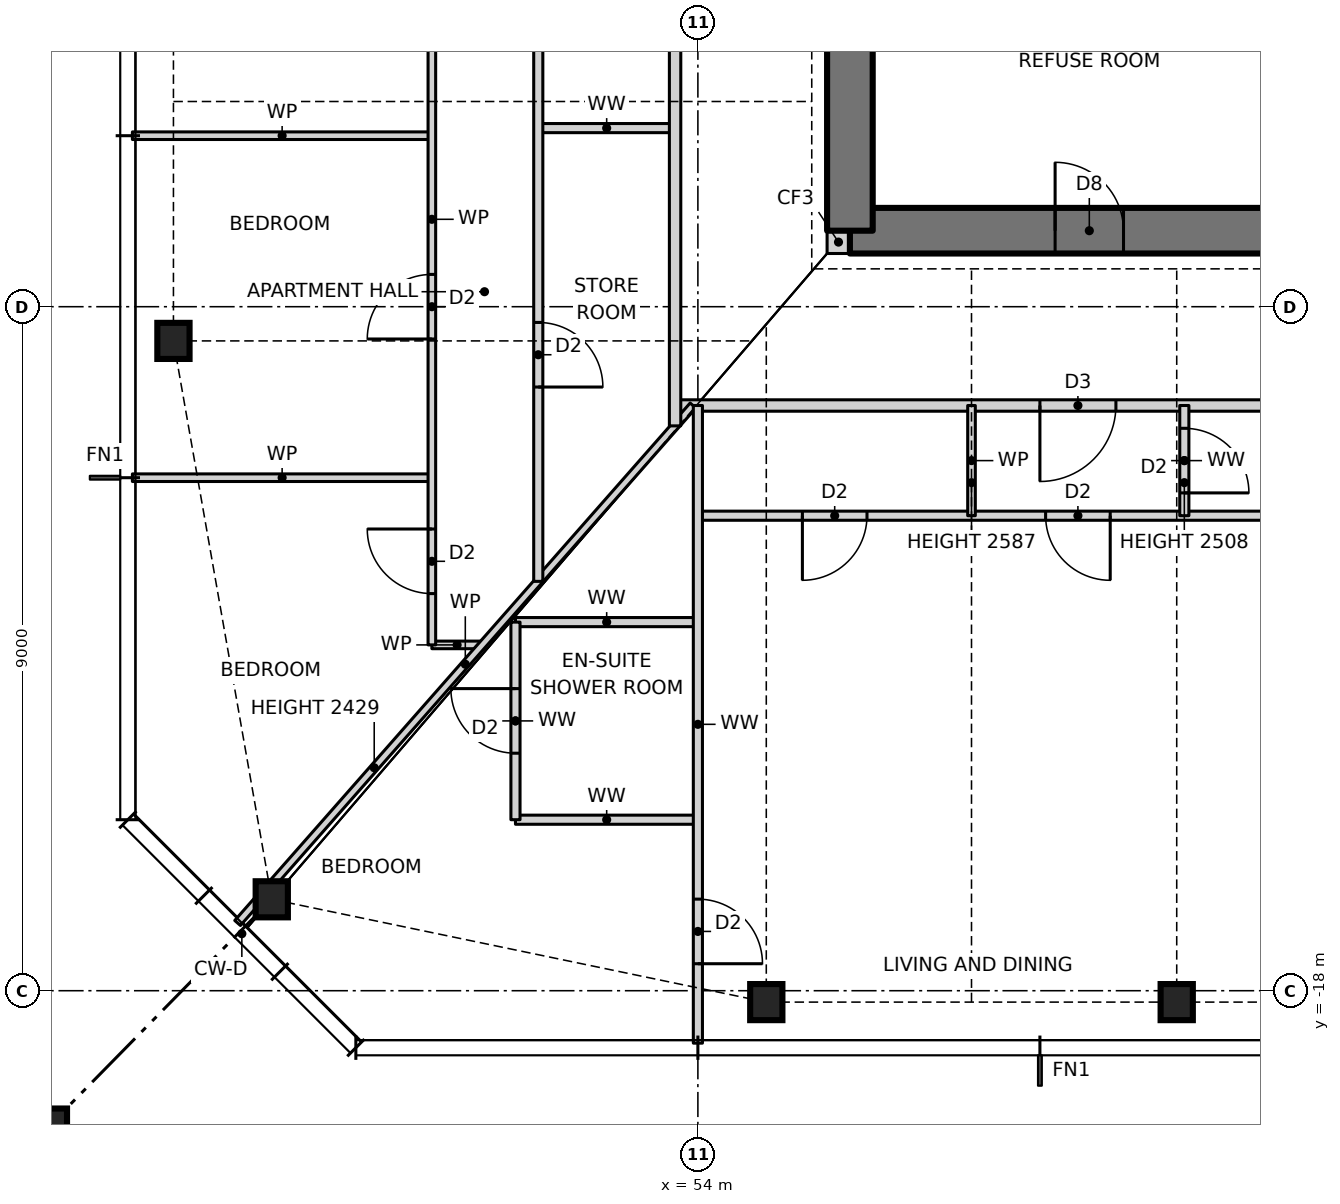
"""IFC4 building model, lengths in metres.
Left out: names, types, materials, properties, quantities, classifications, styles, units other than length and angle.
Written with IfcOpenShell. Run it as: python <this file> out.ifc"""

import sys

from ifc_helpers import new_model, si_unit, direction, frame, frame_2d, origin, origin_2d, place, context, subcontext, project, spatial, rectangle, hollow_rectangle, i_section, extrude, element, fill, save


model = new_model("IFC4")
c1 = context("Model", 3, precision=1e-05, world=origin(), true_north=direction((0.0, 1.0)))
c2 = subcontext(c1, "Body", "Model", "MODEL_VIEW")
j1 = project(units=[si_unit("LENGTHUNIT", "METRE"), si_unit("PLANEANGLEUNIT", "RADIAN")], contexts=[c1])
p1 = place(None, origin())
s1 = spatial("IfcSite", under=j1, at=p1, CompositionType="ELEMENT")
p2 = place(p1, origin())
s2 = spatial("IfcBuilding", under=s1, at=p2, CompositionType="ELEMENT")
p3 = place(p2, frame((0.0, 0.0, 25.5)))
s3 = spatial("IfcBuildingStorey", under=s2, at=p3, CompositionType="ELEMENT", Elevation=25.5)
for number, where, z_axis, x_axis in (
    (1, (48.394, -16.797, 0.0), (0.0, 0.0, 1.0), (1.0, 0.0, 0.0)),
    (2, (54.9, -18.15, 0.0), (0.0, 0.0, 1.0), (1.0, 0.0, 0.0)),
    (3, (60.3, -18.15, 0.0), (0.0, 0.0, 1.0), (1.0, 0.0, 0.0)),
    (4, (47.1, -9.45, 0.0), (0.0, 0.0, 1.0), (1.0, 0.0, 0.0)),
):
    element("IfcColumn", number, at=place(p3, frame(where, z_axis=z_axis, x_axis=x_axis)), inside=s3, PredefinedType="COLUMN", context=c2, shape_type="SweptSolid", body=[
        extrude(i_section(OverallWidth=0.424, OverallDepth=0.475, WebThickness=0.048, FlangeThickness=0.077, at=origin_2d()), origin(), (0.0, 0.0, 1.0), 3.5),
    ])
p4 = place(p3, frame((45.1, -20.15, 0.0), z_axis=(0.0, 0.0, 1.0), x_axis=(1.0, 0.0, 0.0)))
e5 = element("IfcColumn", 5, at=p4, inside=s3, PredefinedType="COLUMN", context=c2, shape_type="SweptSolid", body=[
    extrude(hollow_rectangle(XDim=1.2, YDim=1.2, WallThickness=0.07, at=origin_2d()), origin(), (0.0, 0.0, 1.0), 3.5),
])
p5 = place(p3, frame((55.7, -8.15, 0.0), z_axis=(0.0, 0.0, 1.0), x_axis=(1.0, 0.0, 0.0)))
e6 = element("IfcWall", 6, at=p5, inside=s3, PredefinedType="SOLIDWALL", context=c2, shape_type="SweptSolid", body=[
    extrude(rectangle(XDim=0.3, YDim=0.3, at=frame_2d((0.15, 0.0))), origin(), (0.0, 0.0, 1.0), 3.5),
])
p6 = place(p3, frame((56.0, -8.0, 0.0), z_axis=(0.0, 0.0, 1.0), x_axis=(1.0, 0.0, 0.0)))
e7 = element("IfcWall", 7, at=p6, inside=s3, PredefinedType="SHEAR", context=c2, shape_type="SweptSolid", body=[
    extrude(rectangle(XDim=14.0, YDim=0.6, at=frame_2d((7.0, 0.0))), origin(), (0.0, 0.0, 1.0), 3.5),
])
p7 = place(p6, frame((2.7, 0.0, 0.0)))
e8 = element("IfcOpeningElement", 8, at=p7, cuts=e7, PredefinedType="OPENING", context=c2, shape_type="SweptSolid", body=[
    extrude(rectangle(XDim=0.9, YDim=2.1, at=frame_2d((0.45, 1.05))), frame((0.0, 0.31, 0.0), z_axis=(0.0, -1.0, 0.0), x_axis=(1.0, 0.0, 0.0)), (0.0, 0.0, 1.0), 0.62),
])
p8 = place(p6, frame((7.7, 0.0, 0.0)))
e9 = element("IfcOpeningElement", 9, at=p8, cuts=e7, PredefinedType="OPENING", context=c2, shape_type="SweptSolid", body=[
    extrude(rectangle(XDim=0.9, YDim=2.1, at=frame_2d((0.45, 1.05))), frame((0.0, 0.31, 0.0), z_axis=(0.0, -1.0, 0.0), x_axis=(1.0, 0.0, 0.0)), (0.0, 0.0, 1.0), 0.62),
])
p9 = place(p3, frame((56.0, 8.0, 0.0), z_axis=(0.0, 0.0, 1.0), x_axis=(0.0, -1.0, 0.0)))
e10 = element("IfcWall", 10, at=p9, inside=s3, PredefinedType="SHEAR", context=c2, shape_type="SweptSolid", body=[
    extrude(rectangle(XDim=16.0, YDim=0.6, at=frame_2d((8.0, 0.0))), origin(), (0.0, 0.0, 1.0), 3.5),
])
p10 = place(p9, frame((7.5, 0.0, 0.0)))
e11 = element("IfcOpeningElement", 11, at=p10, cuts=e10, PredefinedType="OPENING", context=c2, shape_type="SweptSolid", body=[
    extrude(rectangle(XDim=1.0, YDim=2.1, at=frame_2d((0.5, 1.05))), frame((0.0, 0.31, 0.0), z_axis=(0.0, -1.0, 0.0), x_axis=(1.0, 0.0, 0.0)), (0.0, 0.0, 1.0), 0.62),
])
p11 = place(p3, frame((51.6, -15.75, 0.0), z_axis=(0.0, 0.0, 1.0), x_axis=(1.0, 0.0, 0.0)))
e12 = element("IfcWall", 12, at=p11, inside=s3, PredefinedType="PARTITIONING", context=c2, shape_type="SweptSolid", body=[
    extrude(rectangle(XDim=2.4, YDim=0.12, at=frame_2d((1.2, 0.0))), origin(), (0.0, 0.0, 1.0), 3.27),
])
p12 = place(p3, frame((50.5, -13.45, 0.0), z_axis=(0.0, 0.0, 1.0), x_axis=(1.0, 0.0, 0.0)))
e13 = element("IfcWall", 13, at=p12, inside=s3, PredefinedType="PARTITIONING", context=c2, shape_type="SweptSolid", body=[
    extrude(rectangle(XDim=0.664, YDim=0.1, at=frame_2d((0.332, 0.0))), origin(), (0.0, 0.0, 1.0), 3.27),
])
p13 = place(p3, frame((51.6, -13.15, 0.0), z_axis=(0.0, 0.0, 1.0), x_axis=(1.0, 0.0, 0.0)))
e14 = element("IfcWall", 14, at=p13, inside=s3, PredefinedType="PARTITIONING", context=c2, shape_type="SweptSolid", body=[
    extrude(rectangle(XDim=2.4, YDim=0.12, at=frame_2d((1.2, 0.0))), origin(), (0.0, 0.0, 1.0), 3.27),
])
p14 = place(p3, frame((54.0, -11.75, 0.0), z_axis=(0.0, 0.0, 1.0), x_axis=(1.0, 0.0, 0.0)))
e15 = element("IfcWall", 15, at=p14, inside=s3, PredefinedType="PARTITIONING", context=c2, shape_type="SweptSolid", body=[
    extrude(rectangle(XDim=19.34, YDim=0.12, at=frame_2d((9.67, 0.0))), origin(), (0.0, 0.0, 1.0), 3.27),
])
p15 = place(p14, frame((1.375, 0.0, 0.0)))
e16 = element("IfcOpeningElement", 16, at=p15, cuts=e15, PredefinedType="OPENING", context=c2, shape_type="SweptSolid", body=[
    extrude(rectangle(XDim=0.85, YDim=2.1, at=frame_2d((0.425, 1.05))), frame((0.0, 0.07, 0.0), z_axis=(0.0, -1.0, 0.0), x_axis=(1.0, 0.0, 0.0)), (0.0, 0.0, 1.0), 0.14),
])
p16 = place(p14, frame((4.575, 0.0, 0.0)))
e17 = element("IfcOpeningElement", 17, at=p16, cuts=e15, PredefinedType="OPENING", context=c2, shape_type="SweptSolid", body=[
    extrude(rectangle(XDim=0.85, YDim=2.1, at=frame_2d((0.425, 1.05))), frame((0.0, 0.07, 0.0), z_axis=(0.0, -1.0, 0.0), x_axis=(1.0, 0.0, 0.0)), (0.0, 0.0, 1.0), 0.14),
])
p17 = place(p14, frame((11.325, 0.0, 0.0)))
e18 = element("IfcOpeningElement", 18, at=p17, cuts=e15, PredefinedType="OPENING", context=c2, shape_type="SweptSolid", body=[
    extrude(rectangle(XDim=0.85, YDim=2.1, at=frame_2d((0.425, 1.05))), frame((0.0, 0.07, 0.0), z_axis=(0.0, -1.0, 0.0), x_axis=(1.0, 0.0, 0.0)), (0.0, 0.0, 1.0), 0.14),
])
p18 = place(p14, frame((16.495, 0.0, 0.0)))
e19 = element("IfcOpeningElement", 19, at=p18, cuts=e15, PredefinedType="OPENING", context=c2, shape_type="SweptSolid", body=[
    extrude(rectangle(XDim=0.85, YDim=2.1, at=frame_2d((0.425, 1.05))), frame((0.0, 0.07, 0.0), z_axis=(0.0, -1.0, 0.0), x_axis=(1.0, 0.0, 0.0)), (0.0, 0.0, 1.0), 0.14),
])
p19 = place(p3, frame((46.56, -11.25, 0.0), z_axis=(0.0, 0.0, 1.0), x_axis=(1.0, 0.0, 0.0)))
e20 = element("IfcWall", 20, at=p19, inside=s3, PredefinedType="PARTITIONING", context=c2, shape_type="SweptSolid", body=[
    extrude(rectangle(XDim=3.94, YDim=0.1, at=frame_2d((1.97, 0.0))), origin(), (0.0, 0.0, 1.0), 3.27),
])
p20 = place(p3, frame((53.7, -10.3, 0.0), z_axis=(0.0, 0.0, 1.0), x_axis=(1.0, 0.0, 0.0)))
e21 = element("IfcWall", 21, at=p20, inside=s3, PredefinedType="PARTITIONING", context=c2, shape_type="SweptSolid", body=[
    extrude(rectangle(XDim=18.6, YDim=0.15, at=frame_2d((9.3, 0.0))), origin(), (0.0, 0.0, 1.0), 3.27),
])
p21 = place(p20, frame((4.8, 0.0, 0.0)))
e22 = element("IfcOpeningElement", 22, at=p21, cuts=e21, PredefinedType="OPENING", context=c2, shape_type="SweptSolid", body=[
    extrude(rectangle(XDim=1.0, YDim=2.1, at=frame_2d((0.5, 1.05))), frame((0.0, 0.085, 0.0), z_axis=(0.0, -1.0, 0.0), x_axis=(1.0, 0.0, 0.0)), (0.0, 0.0, 1.0), 0.17),
])
p22 = place(p3, frame((46.56, -6.75, 0.0), z_axis=(0.0, 0.0, 1.0), x_axis=(1.0, 0.0, 0.0)))
e23 = element("IfcWall", 23, at=p22, inside=s3, PredefinedType="PARTITIONING", context=c2, shape_type="SweptSolid", body=[
    extrude(rectangle(XDim=3.94, YDim=0.1, at=frame_2d((1.97, 0.0))), origin(), (0.0, 0.0, 1.0), 3.27),
])
p23 = place(p3, frame((51.9, -6.65, 0.0), z_axis=(0.0, 0.0, 1.0), x_axis=(1.0, 0.0, 0.0)))
e24 = element("IfcWall", 24, at=p23, inside=s3, PredefinedType="PARTITIONING", context=c2, shape_type="SweptSolid", body=[
    extrude(rectangle(XDim=1.8, YDim=0.12, at=frame_2d((0.9, 0.0))), origin(), (0.0, 0.0, 1.0), 3.27),
])
p24 = place(p3, frame((47.944, -17.109, 0.0), z_axis=(0.0, 0.0, 1.0), x_axis=(0.660638210404, 0.750704439146, 0.0)))
e25 = element("IfcWall", 25, at=p24, inside=s3, PredefinedType="PARTITIONING", context=c2, shape_type="SweptSolid", body=[
    extrude(rectangle(XDim=9.07, YDim=0.1, at=frame_2d((4.535, 0.0))), origin(), (0.0, 0.0, 1.0), 2.429),
])
p25 = place(p3, frame((60.4, -11.75, 0.0), z_axis=(0.0, 0.0, 1.0), x_axis=(0.0, 1.0, 0.0)))
e26 = element("IfcWall", 26, at=p25, inside=s3, PredefinedType="PARTITIONING", context=c2, shape_type="SweptSolid", body=[
    extrude(rectangle(XDim=1.45, YDim=0.12, at=frame_2d((0.725, 0.0))), origin(), (0.0, 0.0, 1.0), 2.508),
])
p26 = place(p25, frame((0.3, 0.0, 0.0)))
e27 = element("IfcOpeningElement", 27, at=p26, cuts=e26, PredefinedType="OPENING", context=c2, shape_type="SweptSolid", body=[
    extrude(rectangle(XDim=0.85, YDim=2.1, at=frame_2d((0.425, 1.05))), frame((0.0, 0.07, 0.0), z_axis=(0.0, -1.0, 0.0), x_axis=(1.0, 0.0, 0.0)), (0.0, 0.0, 1.0), 0.14),
])
p27 = place(p3, frame((57.6, -11.75, 0.0), z_axis=(0.0, 0.0, 1.0), x_axis=(0.0, 1.0, 0.0)))
e28 = element("IfcWall", 28, at=p27, inside=s3, PredefinedType="PARTITIONING", context=c2, shape_type="SweptSolid", body=[
    extrude(rectangle(XDim=1.45, YDim=0.1, at=frame_2d((0.725, 0.0))), origin(), (0.0, 0.0, 1.0), 2.587),
])
p28 = place(p3, frame((54.0, -18.69, 0.0), z_axis=(0.0, 0.0, 1.0), x_axis=(0.0, 1.0, 0.0)))
e29 = element("IfcWall", 29, at=p28, inside=s3, PredefinedType="PARTITIONING", context=c2, shape_type="SweptSolid", body=[
    extrude(rectangle(XDim=8.39, YDim=0.12, at=frame_2d((4.195, 0.0))), origin(), (0.0, 0.0, 1.0), 3.27),
])
p29 = place(p28, frame((1.045, 0.0, 0.0)))
e30 = element("IfcOpeningElement", 30, at=p29, cuts=e29, PredefinedType="OPENING", context=c2, shape_type="SweptSolid", body=[
    extrude(rectangle(XDim=0.85, YDim=2.1, at=frame_2d((0.425, 1.05))), frame((0.0, 0.07, 0.0), z_axis=(0.0, -1.0, 0.0), x_axis=(1.0, 0.0, 0.0)), (0.0, 0.0, 1.0), 0.14),
])
p30 = place(p3, frame((53.7, -10.568, 0.0), z_axis=(0.0, 0.0, 1.0), x_axis=(0.0, 1.0, 0.0)))
e31 = element("IfcWall", 31, at=p30, inside=s3, PredefinedType="PARTITIONING", context=c2, shape_type="SweptSolid", body=[
    extrude(rectangle(XDim=21.136, YDim=0.15, at=frame_2d((10.568, 0.0))), origin(), (0.0, 0.0, 1.0), 3.27),
])
p31 = place(p30, frame((11.818, 0.0, 0.0)))
e32 = element("IfcOpeningElement", 32, at=p31, cuts=e31, PredefinedType="OPENING", context=c2, shape_type="SweptSolid", body=[
    extrude(rectangle(XDim=1.0, YDim=2.1, at=frame_2d((0.5, 1.05))), frame((0.0, 0.085, 0.0), z_axis=(0.0, -1.0, 0.0), x_axis=(1.0, 0.0, 0.0)), (0.0, 0.0, 1.0), 0.17),
])
p32 = place(p3, frame((51.9, -12.614, 0.0), z_axis=(0.0, 0.0, 1.0), x_axis=(0.0, 1.0, 0.0)))
e33 = element("IfcWall", 33, at=p32, inside=s3, PredefinedType="PARTITIONING", context=c2, shape_type="SweptSolid", body=[
    extrude(rectangle(XDim=25.228, YDim=0.12, at=frame_2d((12.614, 0.0))), origin(), (0.0, 0.0, 1.0), 3.27),
])
p33 = place(p32, frame((17.139, 0.0, 0.0)))
e34 = element("IfcOpeningElement", 34, at=p33, cuts=e33, PredefinedType="OPENING", context=c2, shape_type="SweptSolid", body=[
    extrude(rectangle(XDim=0.85, YDim=2.1, at=frame_2d((0.425, 1.05))), frame((0.0, 0.07, 0.0), z_axis=(0.0, -1.0, 0.0), x_axis=(1.0, 0.0, 0.0)), (0.0, 0.0, 1.0), 0.14),
])
p34 = place(p32, frame((13.939, 0.0, 0.0)))
e35 = element("IfcOpeningElement", 35, at=p34, cuts=e33, PredefinedType="OPENING", context=c2, shape_type="SweptSolid", body=[
    extrude(rectangle(XDim=0.85, YDim=2.1, at=frame_2d((0.425, 1.05))), frame((0.0, 0.07, 0.0), z_axis=(0.0, -1.0, 0.0), x_axis=(1.0, 0.0, 0.0)), (0.0, 0.0, 1.0), 0.14),
])
p35 = place(p32, frame((21.871, 0.0, 0.0)))
e36 = element("IfcOpeningElement", 36, at=p35, cuts=e33, PredefinedType="OPENING", context=c2, shape_type="SweptSolid", body=[
    extrude(rectangle(XDim=0.85, YDim=2.1, at=frame_2d((0.425, 1.05))), frame((0.0, 0.07, 0.0), z_axis=(0.0, -1.0, 0.0), x_axis=(1.0, 0.0, 0.0)), (0.0, 0.0, 1.0), 0.14),
])
p36 = place(p32, frame((7.739, 0.0, 0.0)))
e37 = element("IfcOpeningElement", 37, at=p36, cuts=e33, PredefinedType="OPENING", context=c2, shape_type="SweptSolid", body=[
    extrude(rectangle(XDim=0.85, YDim=2.1, at=frame_2d((0.425, 1.05))), frame((0.0, 0.07, 0.0), z_axis=(0.0, -1.0, 0.0), x_axis=(1.0, 0.0, 0.0)), (0.0, 0.0, 1.0), 0.14),
])
p37 = place(p32, frame((2.557, 0.0, 0.0)))
e38 = element("IfcOpeningElement", 38, at=p37, cuts=e33, PredefinedType="OPENING", context=c2, shape_type="SweptSolid", body=[
    extrude(rectangle(XDim=0.85, YDim=2.1, at=frame_2d((0.425, 1.05))), frame((0.0, 0.07, 0.0), z_axis=(0.0, -1.0, 0.0), x_axis=(1.0, 0.0, 0.0)), (0.0, 0.0, 1.0), 0.14),
])
p38 = place(p3, frame((51.6, -15.75, 0.0), z_axis=(0.0, 0.0, 1.0), x_axis=(0.0, 1.0, 0.0)))
e39 = element("IfcWall", 39, at=p38, inside=s3, PredefinedType="PARTITIONING", context=c2, shape_type="SweptSolid", body=[
    extrude(rectangle(XDim=2.6, YDim=0.12, at=frame_2d((1.3, 0.0))), origin(), (0.0, 0.0, 1.0), 3.27),
])
p39 = place(p38, frame((0.875, 0.0, 0.0)))
e40 = element("IfcOpeningElement", 40, at=p39, cuts=e39, PredefinedType="OPENING", context=c2, shape_type="SweptSolid", body=[
    extrude(rectangle(XDim=0.85, YDim=2.1, at=frame_2d((0.425, 1.05))), frame((0.0, 0.07, 0.0), z_axis=(0.0, -1.0, 0.0), x_axis=(1.0, 0.0, 0.0)), (0.0, 0.0, 1.0), 0.14),
])
p40 = place(p3, frame((50.5, -13.45, 0.0), z_axis=(0.0, 0.0, 1.0), x_axis=(0.0, 1.0, 0.0)))
e41 = element("IfcWall", 41, at=p40, inside=s3, PredefinedType="PARTITIONING", context=c2, shape_type="SweptSolid", body=[
    extrude(rectangle(XDim=11.2, YDim=0.1, at=frame_2d((5.6, 0.0))), origin(), (0.0, 0.0, 1.0), 3.27),
])
p41 = place(p40, frame((8.525, 0.0, 0.0)))
e42 = element("IfcOpeningElement", 42, at=p41, cuts=e41, PredefinedType="OPENING", context=c2, shape_type="SweptSolid", body=[
    extrude(rectangle(XDim=0.85, YDim=2.1, at=frame_2d((0.425, 1.05))), frame((0.0, 0.06, 0.0), z_axis=(0.0, -1.0, 0.0), x_axis=(1.0, 0.0, 0.0)), (0.0, 0.0, 1.0), 0.12),
])
p42 = place(p40, frame((4.025, 0.0, 0.0)))
e43 = element("IfcOpeningElement", 43, at=p42, cuts=e41, PredefinedType="OPENING", context=c2, shape_type="SweptSolid", body=[
    extrude(rectangle(XDim=0.85, YDim=2.1, at=frame_2d((0.425, 1.05))), frame((0.0, 0.06, 0.0), z_axis=(0.0, -1.0, 0.0), x_axis=(1.0, 0.0, 0.0)), (0.0, 0.0, 1.0), 0.12),
])
p43 = place(p40, frame((0.675, 0.0, 0.0)))
e44 = element("IfcOpeningElement", 44, at=p43, cuts=e41, PredefinedType="OPENING", context=c2, shape_type="SweptSolid", body=[
    extrude(rectangle(XDim=0.85, YDim=2.1, at=frame_2d((0.425, 1.05))), frame((0.0, 0.06, 0.0), z_axis=(0.0, -1.0, 0.0), x_axis=(1.0, 0.0, 0.0)), (0.0, 0.0, 1.0), 0.12),
])
p44 = place(p15, frame((0.85, 0.0, 0.0), z_axis=(0.0, 0.0, 1.0), x_axis=(-1.0, 0.0, 0.0)))
e45 = element("IfcDoor", 45, at=p44, inside=s3, OperationType="SINGLE_SWING_RIGHT", PredefinedType="DOOR", context=c2, shape_type="SweptSolid", body=[
    extrude(rectangle(XDim=0.85, YDim=2.1, at=frame_2d((0.425, 1.05))), frame((0.0, 0.025, 0.0), z_axis=(0.0, -1.0, 0.0), x_axis=(1.0, 0.0, 0.0)), (0.0, 0.0, 1.0), 0.05),
])
fill(e16, e45)
p45 = place(p21, frame((1.0, 0.0, 0.0), z_axis=(0.0, 0.0, 1.0), x_axis=(-1.0, 0.0, 0.0)))
e46 = element("IfcDoor", 46, at=p45, inside=s3, OperationType="SINGLE_SWING_RIGHT", PredefinedType="DOOR", context=c2, shape_type="SweptSolid", body=[
    extrude(rectangle(XDim=1.0, YDim=2.1, at=frame_2d((0.5, 1.05))), frame((0.0, 0.025, 0.0), z_axis=(0.0, -1.0, 0.0), x_axis=(1.0, 0.0, 0.0)), (0.0, 0.0, 1.0), 0.05),
])
fill(e22, e46)
p46 = place(p16, frame((0.85, 0.0, 0.0), z_axis=(0.0, 0.0, 1.0), x_axis=(-1.0, 0.0, 0.0)))
e47 = element("IfcDoor", 47, at=p46, inside=s3, OperationType="SINGLE_SWING_LEFT", PredefinedType="DOOR", context=c2, shape_type="SweptSolid", body=[
    extrude(rectangle(XDim=0.85, YDim=2.1, at=frame_2d((0.425, 1.05))), frame((0.0, 0.025, 0.0), z_axis=(0.0, -1.0, 0.0), x_axis=(1.0, 0.0, 0.0)), (0.0, 0.0, 1.0), 0.05),
])
fill(e17, e47)
p47 = place(p26, frame((0.85, 0.0, 0.0), z_axis=(0.0, 0.0, 1.0), x_axis=(-1.0, 0.0, 0.0)))
e48 = element("IfcDoor", 48, at=p47, inside=s3, OperationType="SINGLE_SWING_RIGHT", PredefinedType="DOOR", context=c2, shape_type="SweptSolid", body=[
    extrude(rectangle(XDim=0.85, YDim=2.1, at=frame_2d((0.425, 1.05))), frame((0.0, 0.025, 0.0), z_axis=(0.0, -1.0, 0.0), x_axis=(1.0, 0.0, 0.0)), (0.0, 0.0, 1.0), 0.05),
])
fill(e27, e48)
p48 = place(p39, origin())
e49 = element("IfcDoor", 49, at=p48, inside=s3, OperationType="SINGLE_SWING_RIGHT", PredefinedType="DOOR", context=c2, shape_type="SweptSolid", body=[
    extrude(rectangle(XDim=0.85, YDim=2.1, at=frame_2d((0.425, 1.05))), frame((0.0, 0.025, 0.0), z_axis=(0.0, -1.0, 0.0), x_axis=(1.0, 0.0, 0.0)), (0.0, 0.0, 1.0), 0.05),
])
fill(e40, e49)
p49 = place(p29, frame((0.85, 0.0, 0.0), z_axis=(0.0, 0.0, 1.0), x_axis=(-1.0, 0.0, 0.0)))
e50 = element("IfcDoor", 50, at=p49, inside=s3, OperationType="SINGLE_SWING_RIGHT", PredefinedType="DOOR", context=c2, shape_type="SweptSolid", body=[
    extrude(rectangle(XDim=0.85, YDim=2.1, at=frame_2d((0.425, 1.05))), frame((0.0, 0.025, 0.0), z_axis=(0.0, -1.0, 0.0), x_axis=(1.0, 0.0, 0.0)), (0.0, 0.0, 1.0), 0.05),
])
fill(e30, e50)
p50 = place(p42, origin())
e51 = element("IfcDoor", 51, at=p50, inside=s3, OperationType="SINGLE_SWING_LEFT", PredefinedType="DOOR", context=c2, shape_type="SweptSolid", body=[
    extrude(rectangle(XDim=0.85, YDim=2.1, at=frame_2d((0.425, 1.05))), frame((0.0, 0.025, 0.0), z_axis=(0.0, -1.0, 0.0), x_axis=(1.0, 0.0, 0.0)), (0.0, 0.0, 1.0), 0.05),
])
fill(e43, e51)
p51 = place(p43, origin())
e52 = element("IfcDoor", 52, at=p51, inside=s3, OperationType="SINGLE_SWING_RIGHT", PredefinedType="DOOR", context=c2, shape_type="SweptSolid", body=[
    extrude(rectangle(XDim=0.85, YDim=2.1, at=frame_2d((0.425, 1.05))), frame((0.0, 0.025, 0.0), z_axis=(0.0, -1.0, 0.0), x_axis=(1.0, 0.0, 0.0)), (0.0, 0.0, 1.0), 0.05),
])
fill(e44, e52)
p52 = place(p37, frame((0.85, 0.0, 0.0), z_axis=(0.0, 0.0, 1.0), x_axis=(-1.0, 0.0, 0.0)))
e53 = element("IfcDoor", 53, at=p52, inside=s3, OperationType="SINGLE_SWING_RIGHT", PredefinedType="DOOR", context=c2, shape_type="SweptSolid", body=[
    extrude(rectangle(XDim=0.85, YDim=2.1, at=frame_2d((0.425, 1.05))), frame((0.0, 0.025, 0.0), z_axis=(0.0, -1.0, 0.0), x_axis=(1.0, 0.0, 0.0)), (0.0, 0.0, 1.0), 0.05),
])
fill(e38, e53)
p53 = place(p7, origin())
e54 = element("IfcDoor", 54, at=p53, inside=s3, OperationType="SINGLE_SWING_LEFT", PredefinedType="DOOR", context=c2, shape_type="SweptSolid", body=[
    extrude(rectangle(XDim=0.9, YDim=2.1, at=frame_2d((0.45, 1.05))), frame((0.0, 0.025, 0.0), z_axis=(0.0, -1.0, 0.0), x_axis=(1.0, 0.0, 0.0)), (0.0, 0.0, 1.0), 0.05),
])
fill(e8, e54)
save(model, sys.argv[1])
